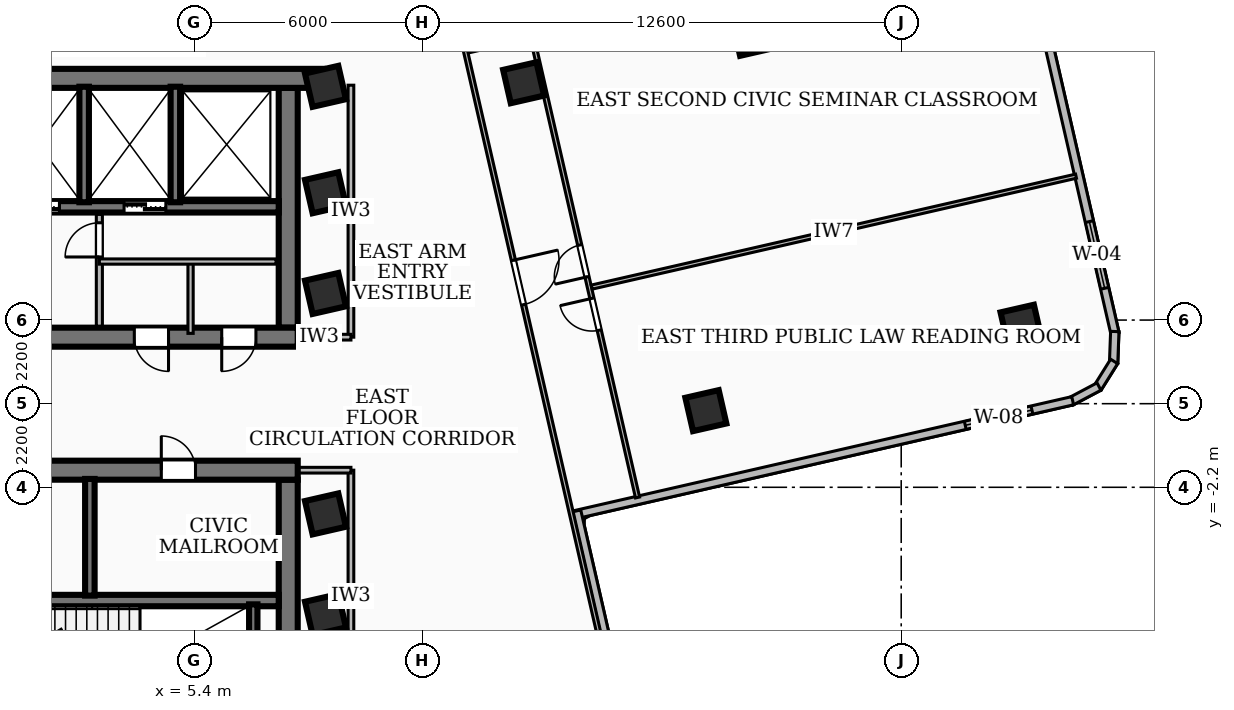
"""IFC4 building model, lengths in metres.
Left out: names, types, materials, properties, quantities, classifications, styles, units other than length and angle.
Written with IfcOpenShell. Run it as: python <this file> out.ifc"""

import sys

from ifc_helpers import new_model, si_unit, direction, frame, frame_2d, origin, origin_2d, place, context, subcontext, project, spatial, rectangle, extrude, element, fill, save


model = new_model("IFC4")
c1 = context("Model", 3, precision=1e-05, world=origin(), true_north=direction((0.0, 1.0)))
c2 = subcontext(c1, "Body", "Model", "MODEL_VIEW")
j1 = project(units=[si_unit("LENGTHUNIT", "METRE"), si_unit("PLANEANGLEUNIT", "RADIAN")], contexts=[c1])
p1 = place(None, origin())
s1 = spatial("IfcSite", under=j1, at=p1, CompositionType="ELEMENT")
p2 = place(p1, origin())
s2 = spatial("IfcBuilding", under=s1, at=p2, CompositionType="ELEMENT")
p3 = place(p2, frame((0.0, 0.0, 123.48)))
s3 = spatial("IfcBuildingStorey", under=s2, at=p3, CompositionType="ELEMENT", Elevation=123.48)
p4 = place(p3, frame((-8.78, 8.56, 0.0), z_axis=(0.0, 0.0, 1.0), x_axis=(1.0, 0.0, 0.0)))
e1 = element("IfcWall", 1, at=p4, inside=s3, PredefinedType="SHEAR", context=c2, shape_type="SweptSolid", body=[
    extrude(rectangle(XDim=17.56, YDim=0.5, at=frame_2d((8.78, 0.0))), origin(), (0.0, 0.0, 1.0), 3.34),
])
p5 = place(p3, frame((8.12, 1.75, 0.0), z_axis=(0.0, 0.0, 1.0), x_axis=(-1.0, 0.0, 0.0)))
e2 = element("IfcWall", 2, at=p5, inside=s3, PredefinedType="SHEAR", context=c2, shape_type="SweptSolid", body=[
    extrude(rectangle(XDim=16.24, YDim=0.5, at=frame_2d((8.12, 0.0))), origin(), (0.0, 0.0, 1.0), 3.34),
])
p6 = place(p5, frame((7.45, 0.0, 0.0)))
e3 = element("IfcOpeningElement", 3, at=p6, cuts=e2, PredefinedType="OPENING", context=c2, shape_type="SweptSolid", body=[
    extrude(rectangle(XDim=1.0, YDim=2.1, at=frame_2d((0.5, 1.05))), frame((0.0, 0.26, 0.0), z_axis=(0.0, -1.0, 0.0), x_axis=(1.0, 0.0, 0.0)), (0.0, 0.0, 1.0), 0.52),
])
p7 = place(p5, frame((3.4, 0.0, 0.0)))
e4 = element("IfcOpeningElement", 4, at=p7, cuts=e2, PredefinedType="OPENING", context=c2, shape_type="SweptSolid", body=[
    extrude(rectangle(XDim=0.9, YDim=2.06, at=frame_2d((0.45, 1.03))), frame((0.0, 0.26, 0.0), z_axis=(0.0, -1.0, 0.0), x_axis=(1.0, 0.0, 0.0)), (0.0, 0.0, 1.0), 0.52),
])
p8 = place(p5, frame((1.1, 0.0, 0.0)))
e5 = element("IfcOpeningElement", 5, at=p8, cuts=e2, PredefinedType="OPENING", context=c2, shape_type="SweptSolid", body=[
    extrude(rectangle(XDim=0.9, YDim=2.06, at=frame_2d((0.45, 1.03))), frame((0.0, 0.26, 0.0), z_axis=(0.0, -1.0, 0.0), x_axis=(1.0, 0.0, 0.0)), (0.0, 0.0, 1.0), 0.52),
])
p9 = place(p3, frame((7.87, 8.31, 0.0), z_axis=(0.0, 0.0, 1.0), x_axis=(0.0, -1.0, 0.0)))
e6 = element("IfcWall", 6, at=p9, inside=s3, PredefinedType="SHEAR", context=c2, shape_type="SweptSolid", body=[
    extrude(rectangle(XDim=6.31, YDim=0.5, at=frame_2d((3.155, 0.0))), origin(), (0.0, 0.0, 1.0), 3.34),
])
p10 = place(p3, frame((7.62, 5.18, 0.0), z_axis=(0.0, 0.0, 1.0), x_axis=(-1.0, 0.0, 0.0)))
e7 = element("IfcWall", 7, at=p10, inside=s3, PredefinedType="SOLIDWALL", context=c2, shape_type="SweptSolid", body=[
    extrude(rectangle(XDim=15.24, YDim=0.3, at=frame_2d((7.62, 0.0))), origin(), (0.0, 0.0, 1.0), 3.34),
])
p11 = place(p10, frame((5.77, 0.0, 0.0)))
e8 = element("IfcOpeningElement", 8, at=p11, cuts=e7, PredefinedType="OPENING", context=c2, shape_type="SweptSolid", body=[
    extrude(rectangle(XDim=1.1, YDim=2.15, at=frame_2d((0.55, 1.075))), frame((0.0, 0.16, 0.0), z_axis=(0.0, -1.0, 0.0), x_axis=(1.0, 0.0, 0.0)), (0.0, 0.0, 1.0), 0.32),
])
p12 = place(p10, frame((2.97, 0.0, 0.0)))
e9 = element("IfcOpeningElement", 9, at=p12, cuts=e7, PredefinedType="OPENING", context=c2, shape_type="SweptSolid", body=[
    extrude(rectangle(XDim=1.1, YDim=2.15, at=frame_2d((0.55, 1.075))), frame((0.0, 0.16, 0.0), z_axis=(0.0, -1.0, 0.0), x_axis=(1.0, 0.0, 0.0)), (0.0, 0.0, 1.0), 0.32),
])
p13 = place(p10, frame((7.97, 0.0, 0.0)))
e10 = element("IfcOpeningElement", 10, at=p13, cuts=e7, PredefinedType="OPENING", context=c2, shape_type="SweptSolid", body=[
    extrude(rectangle(XDim=1.0, YDim=2.1, at=frame_2d((0.5, 1.05))), frame((0.0, 0.16, 0.0), z_axis=(0.0, -1.0, 0.0), x_axis=(1.0, 0.0, 0.0)), (0.0, 0.0, 1.0), 0.32),
])
p14 = place(p3, frame((-8.12, -1.75, 0.0), z_axis=(0.0, 0.0, 1.0), x_axis=(1.0, 0.0, 0.0)))
e11 = element("IfcWall", 11, at=p14, inside=s3, PredefinedType="SHEAR", context=c2, shape_type="SweptSolid", body=[
    extrude(rectangle(XDim=16.24, YDim=0.5, at=frame_2d((8.12, 0.0))), origin(), (0.0, 0.0, 1.0), 3.34),
])
p15 = place(p14, frame((7.45, 0.0, 0.0)))
e12 = element("IfcOpeningElement", 12, at=p15, cuts=e11, PredefinedType="OPENING", context=c2, shape_type="SweptSolid", body=[
    extrude(rectangle(XDim=1.0, YDim=2.1, at=frame_2d((0.5, 1.05))), frame((0.0, 0.26, 0.0), z_axis=(0.0, -1.0, 0.0), x_axis=(1.0, 0.0, 0.0)), (0.0, 0.0, 1.0), 0.52),
])
p16 = place(p14, frame((12.65, 0.0, 0.0)))
e13 = element("IfcOpeningElement", 13, at=p16, cuts=e11, PredefinedType="OPENING", context=c2, shape_type="SweptSolid", body=[
    extrude(rectangle(XDim=0.9, YDim=2.06, at=frame_2d((0.45, 1.03))), frame((0.0, 0.26, 0.0), z_axis=(0.0, -1.0, 0.0), x_axis=(1.0, 0.0, 0.0)), (0.0, 0.0, 1.0), 0.52),
])
p17 = place(p14, frame((0.565, 0.0, 0.0)))
e14 = element("IfcOpeningElement", 14, at=p17, cuts=e11, PredefinedType="OPENING", context=c2, shape_type="SweptSolid", body=[
    extrude(rectangle(XDim=1.05, YDim=2.15, at=frame_2d((0.525, 1.075))), frame((0.0, 0.26, 0.0), z_axis=(0.0, -1.0, 0.0), x_axis=(1.0, 0.0, 0.0)), (0.0, 0.0, 1.0), 0.52),
])
p18 = place(p14, frame((2.125, 0.0, 0.0)))
e15 = element("IfcOpeningElement", 15, at=p18, cuts=e11, PredefinedType="OPENING", context=c2, shape_type="SweptSolid", body=[
    extrude(rectangle(XDim=1.05, YDim=2.15, at=frame_2d((0.525, 1.075))), frame((0.0, 0.26, 0.0), z_axis=(0.0, -1.0, 0.0), x_axis=(1.0, 0.0, 0.0)), (0.0, 0.0, 1.0), 0.52),
])
p19 = place(p14, frame((3.685, 0.0, 0.0)))
e16 = element("IfcOpeningElement", 16, at=p19, cuts=e11, PredefinedType="OPENING", context=c2, shape_type="SweptSolid", body=[
    extrude(rectangle(XDim=1.05, YDim=2.15, at=frame_2d((0.525, 1.075))), frame((0.0, 0.26, 0.0), z_axis=(0.0, -1.0, 0.0), x_axis=(1.0, 0.0, 0.0)), (0.0, 0.0, 1.0), 0.52),
])
p20 = place(p3, frame((7.87, -2.0, 0.0), z_axis=(0.0, 0.0, 1.0), x_axis=(0.0, -1.0, 0.0)))
e17 = element("IfcWall", 17, at=p20, inside=s3, PredefinedType="SHEAR", context=c2, shape_type="SweptSolid", body=[
    extrude(rectangle(XDim=6.31, YDim=0.5, at=frame_2d((3.155, 0.0))), origin(), (0.0, 0.0, 1.0), 3.34),
])
p21 = place(p3, frame((-7.62, -5.18, 0.0), z_axis=(0.0, 0.0, 1.0), x_axis=(1.0, 0.0, 0.0)))
e18 = element("IfcWall", 18, at=p21, inside=s3, PredefinedType="SOLIDWALL", context=c2, shape_type="SweptSolid", body=[
    extrude(rectangle(XDim=15.24, YDim=0.3, at=frame_2d((7.62, 0.0))), origin(), (0.0, 0.0, 1.0), 3.34),
])
p22 = place(p21, frame((5.77, 0.0, 0.0)))
e19 = element("IfcOpeningElement", 19, at=p22, cuts=e18, PredefinedType="OPENING", context=c2, shape_type="SweptSolid", body=[
    extrude(rectangle(XDim=1.1, YDim=2.15, at=frame_2d((0.55, 1.075))), frame((0.0, 0.16, 0.0), z_axis=(0.0, -1.0, 0.0), x_axis=(1.0, 0.0, 0.0)), (0.0, 0.0, 1.0), 0.32),
])
p23 = place(p21, frame((7.97, 0.0, 0.0)))
e20 = element("IfcOpeningElement", 20, at=p23, cuts=e18, PredefinedType="OPENING", context=c2, shape_type="SweptSolid", body=[
    extrude(rectangle(XDim=1.0, YDim=2.1, at=frame_2d((0.5, 1.05))), frame((0.0, 0.16, 0.0), z_axis=(0.0, -1.0, 0.0), x_axis=(1.0, 0.0, 0.0)), (0.0, 0.0, 1.0), 0.32),
])
p24 = place(p3, frame((6.95, -8.34, 0.0), z_axis=(0.0, 0.0, 1.0), x_axis=(0.0, 1.0, 0.0)))
e21 = element("IfcWall", 21, at=p24, inside=s3, PredefinedType="SOLIDWALL", context=c2, shape_type="SweptSolid", body=[
    extrude(rectangle(XDim=3.06, YDim=0.22, at=frame_2d((1.53, 0.0))), origin(), (0.0, 0.0, 1.0), 3.34),
])
for number, where, z_axis, x_axis in (
    (22, (2.5, 5.3, 0.0), (0.0, 0.0, 1.0), (0.0, 1.0, 0.0)),
    (23, (4.9, 5.3, 0.0), (0.0, 0.0, 1.0), (0.0, 1.0, 0.0)),
):
    element("IfcWall", number, at=place(p3, frame(where, z_axis=z_axis, x_axis=x_axis)), inside=s3, PredefinedType="SOLIDWALL", context=c2, shape_type="SweptSolid", body=[
        extrude(rectangle(XDim=3.04, YDim=0.25, at=frame_2d((1.52, 0.0))), origin(), (0.0, 0.0, 1.0), 3.34),
    ])
p25 = place(p3, frame((2.65, -5.05, 0.0), z_axis=(0.0, 0.0, 1.0), x_axis=(0.0, 1.0, 0.0)))
e24 = element("IfcWall", 24, at=p25, inside=s3, PredefinedType="SOLIDWALL", context=c2, shape_type="SweptSolid", body=[
    extrude(rectangle(XDim=3.07, YDim=0.25, at=frame_2d((1.535, 0.0))), origin(), (0.0, 0.0, 1.0), 3.34),
])
for number, where, z_axis, x_axis in (
    (25, (8.85, -5.55, 0.0), (0.0, 0.0, 1.0), (0.975, 0.223, 0.0)),
    (26, (8.85, -2.9, 0.0), (0.0, 0.0, 1.0), (0.975, 0.223, 0.0)),
    (27, (8.85, 2.9, 0.0), (0.0, 0.0, 1.0), (0.975, 0.223, 0.0)),
    (28, (8.85, 5.55, 0.0), (0.0, 0.0, 1.0), (0.975, 0.223, 0.0)),
    (29, (8.85, 8.35, 0.0), (0.0, 0.0, 1.0), (0.975, 0.223, 0.0)),
    (30, (18.86, -0.183, 0.0), (0.0, 0.0, 1.0), (0.975, 0.223, 0.0)),
    (31, (14.064, 8.445, 0.0), (0.0, 0.0, 1.0), (0.975, 0.223, 0.0)),
    (32, (27.153, 2.064, 0.0), (0.0, 0.0, 1.0), (0.975, 0.223, 0.0)),
    (33, (20.098, 9.692, 0.0), (0.0, 0.0, 1.0), (0.975, 0.223, 0.0)),
):
    element("IfcColumn", number, at=place(p3, frame(where, z_axis=z_axis, x_axis=x_axis)), inside=s3, PredefinedType="COLUMN", context=c2, shape_type="SweptSolid", body=[
        extrude(rectangle(XDim=0.9, YDim=0.9, at=origin_2d()), origin(), (0.0, 0.0, 1.0), 3.6),
    ])
p26 = place(p3, frame((11.182, 15.857, 0.0), z_axis=(0.0, 0.0, 1.0), x_axis=(0.223278912438, -0.974754598481, 0.0)))
e34 = element("IfcWall", 34, at=p26, inside=s3, PredefinedType="SOLIDWALL", context=c2, shape_type="SweptSolid", body=[
    extrude(rectangle(XDim=6.759, YDim=0.22, at=frame_2d((3.379, 0.0))), origin(), (0.0, 0.0, 1.0), 2.644),
])
p27 = place(p3, frame((12.585, 9.335, 0.0), z_axis=(0.0, 0.0, 1.0), x_axis=(0.974754036658, 0.223281365141, 0.0)))
e35 = element("IfcWall", 35, at=p27, inside=s3, PredefinedType="SOLIDWALL", context=c2, shape_type="SweptSolid", body=[
    extrude(rectangle(XDim=13.459, YDim=0.22, at=frame_2d((6.729, 0.0))), origin(), (0.0, 0.0, 1.0), 2.644),
])
p28 = place(p3, frame((27.476, 11.228, 0.0), z_axis=(0.0, 0.0, 1.0), x_axis=(0.223358074049, -0.974736462208, 0.0)))
e36 = element("IfcWall", 36, at=p28, inside=s3, PredefinedType="SOLIDWALL", context=c2, shape_type="SweptSolid", body=[
    extrude(rectangle(XDim=9.621, YDim=0.22, at=frame_2d((4.811, 0.0))), origin(), (0.0, 0.0, 1.0), 3.34),
])
p29 = place(p28, frame((6.604, 0.0, 0.85)))
e37 = element("IfcOpeningElement", 37, at=p29, cuts=e36, PredefinedType="OPENING", context=c2, shape_type="SweptSolid", body=[
    extrude(rectangle(XDim=1.8, YDim=2.0, at=frame_2d((0.9, 1.0))), frame((0.0, 0.12, 0.0), z_axis=(0.0, -1.0, 0.0), x_axis=(1.0, 0.0, 0.0)), (0.0, 0.0, 1.0), 0.24),
])
p30 = place(p3, frame((29.62, 1.899, 0.0), z_axis=(0.0, 0.0, 1.0), x_axis=(-0.037195813461, -0.999307996296, 0.0)))
e38 = element("IfcWall", 38, at=p30, inside=s3, PredefinedType="SOLIDWALL", context=c2, shape_type="SweptSolid", body=[
    extrude(rectangle(XDim=0.833, YDim=0.22, at=frame_2d((0.417, 0.0))), origin(), (0.0, 0.0, 1.0), 3.34),
])
p31 = place(p3, frame((29.603, 1.112, 0.0), z_axis=(0.0, 0.0, 1.0), x_axis=(-0.530240177466, -0.847847482865, 0.0)))
e39 = element("IfcWall", 39, at=p31, inside=s3, PredefinedType="SOLIDWALL", context=c2, shape_type="SweptSolid", body=[
    extrude(rectangle(XDim=0.819, YDim=0.22, at=frame_2d((0.409, 0.0))), origin(), (0.0, 0.0, 1.0), 3.34),
])
p32 = place(p3, frame((29.204, 0.451, 0.0), z_axis=(0.0, 0.0, 1.0), x_axis=(-0.883716798585, -0.468022029287, 0.0)))
e40 = element("IfcWall", 40, at=p32, inside=s3, PredefinedType="SOLIDWALL", context=c2, shape_type="SweptSolid", body=[
    extrude(rectangle(XDim=0.835, YDim=0.22, at=frame_2d((0.417, 0.0))), origin(), (0.0, 0.0, 1.0), 3.34),
])
p33 = place(p3, frame((28.512, 0.078, 0.0), z_axis=(0.0, 0.0, 1.0), x_axis=(-0.974753462872, -0.223283870038, 0.0)))
e41 = element("IfcWall", 41, at=p33, inside=s3, PredefinedType="SOLIDWALL", context=c2, shape_type="SweptSolid", body=[
    extrude(rectangle(XDim=13.458, YDim=0.22, at=frame_2d((6.729, 0.0))), origin(), (0.0, 0.0, 1.0), 3.34),
])
p34 = place(p33, frame((1.1, 0.0, 0.85)))
e42 = element("IfcOpeningElement", 42, at=p34, cuts=e41, PredefinedType="OPENING", context=c2, shape_type="SweptSolid", body=[
    extrude(rectangle(XDim=1.8, YDim=1.8, at=frame_2d((0.9, 0.9))), frame((0.0, 0.12, 0.0), z_axis=(0.0, -1.0, 0.0), x_axis=(1.0, 0.0, 0.0)), (0.0, 0.0, 1.0), 0.24),
])
p35 = place(p3, frame((15.46, -2.821, 0.0), z_axis=(0.0, 0.0, 1.0), x_axis=(0.223278912438, -0.974754598481, 0.0)))
e43 = element("IfcWall", 43, at=p35, inside=s3, PredefinedType="SOLIDWALL", context=c2, shape_type="SweptSolid", body=[
    extrude(rectangle(XDim=6.759, YDim=0.22, at=frame_2d((3.379, 0.0))), origin(), (0.0, 0.0, 1.0), 3.34),
])
p36 = place(p3, frame((2.9, 2.04, 0.0), z_axis=(0.0, 0.0, 1.0), x_axis=(0.0, 1.0, 0.0)))
e44 = element("IfcWall", 44, at=p36, inside=s3, PredefinedType="PARTITIONING", context=c2, shape_type="SweptSolid", body=[
    extrude(rectangle(XDim=2.94, YDim=0.16, at=frame_2d((1.47, 0.0))), origin(), (0.0, 0.0, 1.0), 2.57),
])
p37 = place(p36, frame((1.82, 0.0, 0.0)))
e45 = element("IfcOpeningElement", 45, at=p37, cuts=e44, PredefinedType="OPENING", context=c2, shape_type="SweptSolid", body=[
    extrude(rectangle(XDim=0.9, YDim=2.06, at=frame_2d((0.45, 1.03))), frame((0.0, 0.09, 0.0), z_axis=(0.0, -1.0, 0.0), x_axis=(1.0, 0.0, 0.0)), (0.0, 0.0, 1.0), 0.18),
])
p38 = place(p3, frame((2.9, 3.74, 0.0), z_axis=(0.0, 0.0, 1.0), x_axis=(1.0, 0.0, 0.0)))
e46 = element("IfcWall", 46, at=p38, inside=s3, PredefinedType="PARTITIONING", context=c2, shape_type="SweptSolid", body=[
    extrude(rectangle(XDim=4.65, YDim=0.138, at=frame_2d((2.325, 0.0))), origin(), (0.0, 0.0, 1.0), 3.34),
])
p39 = place(p3, frame((5.3, 1.85, 0.0), z_axis=(0.0, 0.0, 1.0), x_axis=(0.0, 1.0, 0.0)))
e47 = element("IfcWall", 47, at=p39, inside=s3, PredefinedType="PARTITIONING", context=c2, shape_type="SweptSolid", body=[
    extrude(rectangle(XDim=1.89, YDim=0.138, at=frame_2d((0.945, 0.0))), origin(), (0.0, 0.0, 1.0), 2.57),
])
p40 = place(p3, frame((9.52, 1.75, 0.0), z_axis=(0.0, 0.0, 1.0), x_axis=(0.0, 1.0, 0.0)))
e48 = element("IfcWall", 48, at=p40, inside=s3, PredefinedType="PARTITIONING", context=c2, shape_type="SweptSolid", body=[
    extrude(rectangle(XDim=6.63, YDim=0.15, at=frame_2d((3.315, 0.0))), origin(), (0.0, 0.0, 1.0), 2.57),
])
p41 = place(p3, frame((7.85, 1.75, 0.0), z_axis=(0.0, 0.0, 1.0), x_axis=(1.0, 0.0, 0.0)))
e49 = element("IfcWall", 49, at=p41, inside=s3, PredefinedType="PARTITIONING", context=c2, shape_type="SweptSolid", body=[
    extrude(rectangle(XDim=1.67, YDim=0.15, at=frame_2d((0.835, 0.0))), origin(), (0.0, 0.0, 1.0), 2.57),
])
p42 = place(p3, frame((9.52, -8.38, 0.0), z_axis=(0.0, 0.0, 1.0), x_axis=(0.0, 1.0, 0.0)))
e50 = element("IfcWall", 50, at=p42, inside=s3, PredefinedType="PARTITIONING", context=c2, shape_type="SweptSolid", body=[
    extrude(rectangle(XDim=6.63, YDim=0.15, at=frame_2d((3.315, 0.0))), origin(), (0.0, 0.0, 1.0), 2.57),
])
p43 = place(p3, frame((7.85, -1.75, 0.0), z_axis=(0.0, 0.0, 1.0), x_axis=(1.0, 0.0, 0.0)))
e51 = element("IfcWall", 51, at=p43, inside=s3, PredefinedType="PARTITIONING", context=c2, shape_type="SweptSolid", body=[
    extrude(rectangle(XDim=1.67, YDim=0.15, at=frame_2d((0.835, 0.0))), origin(), (0.0, 0.0, 1.0), 2.57),
])
p44 = place(p3, frame((11.692, 12.957, 0.0), z_axis=(0.0, 0.0, 1.0), x_axis=(0.223262093598, -0.97475845088, 0.0)))
e52 = element("IfcWall", 52, at=p44, inside=s3, PredefinedType="PARTITIONING", context=c2, shape_type="SweptSolid", body=[
    extrude(rectangle(XDim=20.04, YDim=0.11, at=frame_2d((10.02, 0.0))), origin(), (0.0, 0.0, 1.0), 2.57),
])
p45 = place(p44, frame((9.42, 0.0, 0.0)))
e53 = element("IfcOpeningElement", 53, at=p45, cuts=e52, PredefinedType="OPENING", context=c2, shape_type="SweptSolid", body=[
    extrude(rectangle(XDim=1.2, YDim=2.1, at=frame_2d((0.6, 1.05))), frame((0.0, 0.065, 0.0), z_axis=(0.0, -1.0, 0.0), x_axis=(1.0, 0.0, 0.0)), (0.0, 0.0, 1.0), 0.13),
])
p46 = place(p3, frame((15.855, 3.067, 0.0), z_axis=(0.0, 0.0, 1.0), x_axis=(0.974758398925, 0.223262320434, 0.0)))
e54 = element("IfcWall", 54, at=p46, inside=s3, PredefinedType="PARTITIONING", context=c2, shape_type="SweptSolid", body=[
    extrude(rectangle(XDim=13.075, YDim=0.11, at=frame_2d((6.538, 0.0))), origin(), (0.0, 0.0, 1.0), 2.72),
])
p47 = place(p3, frame((17.062, -2.468, 0.0), z_axis=(0.0, 0.0, 1.0), x_axis=(-0.223341555051, 0.974740247341, 0.0)))
e55 = element("IfcWall", 55, at=p47, inside=s3, PredefinedType="PARTITIONING", context=c2, shape_type="SweptSolid", body=[
    extrude(rectangle(XDim=12.43, YDim=0.11, at=frame_2d((6.215, 0.0))), origin(), (0.0, 0.0, 1.0), 2.57),
])
p48 = place(p47, frame((4.515, 0.0, 0.0)))
e56 = element("IfcOpeningElement", 56, at=p48, cuts=e55, PredefinedType="OPENING", context=c2, shape_type="SweptSolid", body=[
    extrude(rectangle(XDim=0.86, YDim=2.04, at=frame_2d((0.43, 1.02))), frame((0.0, 0.065, 0.0), z_axis=(0.0, -1.0, 0.0), x_axis=(1.0, 0.0, 0.0)), (0.0, 0.0, 1.0), 0.13),
])
p49 = place(p47, frame((5.955, 0.0, 0.0)))
e57 = element("IfcOpeningElement", 57, at=p49, cuts=e55, PredefinedType="OPENING", context=c2, shape_type="SweptSolid", body=[
    extrude(rectangle(XDim=0.86, YDim=2.04, at=frame_2d((0.43, 1.02))), frame((0.0, 0.065, 0.0), z_axis=(0.0, -1.0, 0.0), x_axis=(1.0, 0.0, 0.0)), (0.0, 0.0, 1.0), 0.13),
])
p50 = place(p29, origin())
e58 = element("IfcWindow", 58, at=p50, inside=s3, PartitioningType="SINGLE_PANEL", PredefinedType="WINDOW", context=c2, shape_type="SweptSolid", body=[
    extrude(rectangle(XDim=1.8, YDim=2.0, at=frame_2d((0.9, 1.0))), frame((0.0, 0.03, 0.0), z_axis=(0.0, -1.0, 0.0), x_axis=(1.0, 0.0, 0.0)), (0.0, 0.0, 1.0), 0.06),
])
fill(e37, e58)
p51 = place(p34, origin())
e59 = element("IfcWindow", 59, at=p51, inside=s3, PartitioningType="SINGLE_PANEL", PredefinedType="WINDOW", context=c2, shape_type="SweptSolid", body=[
    extrude(rectangle(XDim=1.8, YDim=1.8, at=frame_2d((0.9, 0.9))), frame((0.0, 0.03, 0.0), z_axis=(0.0, -1.0, 0.0), x_axis=(1.0, 0.0, 0.0)), (0.0, 0.0, 1.0), 0.06),
])
fill(e42, e59)
p52 = place(p11, origin())
e60 = element("IfcDoor", 60, at=p52, inside=s3, OperationType="DOUBLE_DOOR_SLIDING", PredefinedType="DOOR", context=c2, shape_type="SweptSolid", body=[
    extrude(rectangle(XDim=1.1, YDim=2.15, at=frame_2d((0.55, 1.075))), frame((0.0, 0.025, 0.0), z_axis=(0.0, -1.0, 0.0), x_axis=(1.0, 0.0, 0.0)), (0.0, 0.0, 1.0), 0.05),
])
fill(e8, e60)
p53 = place(p12, origin())
e61 = element("IfcDoor", 61, at=p53, inside=s3, OperationType="DOUBLE_DOOR_SLIDING", PredefinedType="DOOR", context=c2, shape_type="SweptSolid", body=[
    extrude(rectangle(XDim=1.1, YDim=2.15, at=frame_2d((0.55, 1.075))), frame((0.0, 0.025, 0.0), z_axis=(0.0, -1.0, 0.0), x_axis=(1.0, 0.0, 0.0)), (0.0, 0.0, 1.0), 0.05),
])
fill(e9, e61)
p54 = place(p16, origin())
e62 = element("IfcDoor", 62, at=p54, inside=s3, OperationType="SINGLE_SWING_LEFT", PredefinedType="DOOR", context=c2, shape_type="SweptSolid", body=[
    extrude(rectangle(XDim=0.9, YDim=2.06, at=frame_2d((0.45, 1.03))), frame((0.0, 0.025, 0.0), z_axis=(0.0, -1.0, 0.0), x_axis=(1.0, 0.0, 0.0)), (0.0, 0.0, 1.0), 0.05),
])
fill(e13, e62)
p55 = place(p7, origin())
e63 = element("IfcDoor", 63, at=p55, inside=s3, OperationType="SINGLE_SWING_LEFT", PredefinedType="DOOR", context=c2, shape_type="SweptSolid", body=[
    extrude(rectangle(XDim=0.9, YDim=2.06, at=frame_2d((0.45, 1.03))), frame((0.0, 0.025, 0.0), z_axis=(0.0, -1.0, 0.0), x_axis=(1.0, 0.0, 0.0)), (0.0, 0.0, 1.0), 0.05),
])
fill(e4, e63)
p56 = place(p8, origin())
e64 = element("IfcDoor", 64, at=p56, inside=s3, OperationType="SINGLE_SWING_RIGHT", PredefinedType="DOOR", context=c2, shape_type="SweptSolid", body=[
    extrude(rectangle(XDim=0.9, YDim=2.06, at=frame_2d((0.45, 1.03))), frame((0.0, 0.025, 0.0), z_axis=(0.0, -1.0, 0.0), x_axis=(1.0, 0.0, 0.0)), (0.0, 0.0, 1.0), 0.05),
])
fill(e5, e64)
p57 = place(p37, origin())
e65 = element("IfcDoor", 65, at=p57, inside=s3, OperationType="SINGLE_SWING_LEFT", PredefinedType="DOOR", context=c2, shape_type="SweptSolid", body=[
    extrude(rectangle(XDim=0.9, YDim=2.06, at=frame_2d((0.45, 1.03))), frame((0.0, 0.025, 0.0), z_axis=(0.0, -1.0, 0.0), x_axis=(1.0, 0.0, 0.0)), (0.0, 0.0, 1.0), 0.05),
])
fill(e45, e65)
p58 = place(p45, origin())
e66 = element("IfcDoor", 66, at=p58, inside=s3, OperationType="SINGLE_SWING_LEFT", PredefinedType="DOOR", context=c2, shape_type="SweptSolid", body=[
    extrude(rectangle(XDim=1.2, YDim=2.1, at=frame_2d((0.6, 1.05))), frame((0.0, 0.025, 0.0), z_axis=(0.0, -1.0, 0.0), x_axis=(1.0, 0.0, 0.0)), (0.0, 0.0, 1.0), 0.05),
])
fill(e53, e66)
p59 = place(p48, origin())
e67 = element("IfcDoor", 67, at=p59, inside=s3, OperationType="SINGLE_SWING_RIGHT", PredefinedType="DOOR", context=c2, shape_type="SweptSolid", body=[
    extrude(rectangle(XDim=0.86, YDim=2.04, at=frame_2d((0.43, 1.02))), frame((0.0, 0.025, 0.0), z_axis=(0.0, -1.0, 0.0), x_axis=(1.0, 0.0, 0.0)), (0.0, 0.0, 1.0), 0.05),
])
fill(e56, e67)
p60 = place(p49, origin())
e68 = element("IfcDoor", 68, at=p60, inside=s3, OperationType="SINGLE_SWING_LEFT", PredefinedType="DOOR", context=c2, shape_type="SweptSolid", body=[
    extrude(rectangle(XDim=0.86, YDim=2.04, at=frame_2d((0.43, 1.02))), frame((0.0, 0.025, 0.0), z_axis=(0.0, -1.0, 0.0), x_axis=(1.0, 0.0, 0.0)), (0.0, 0.0, 1.0), 0.05),
])
fill(e57, e68)
save(model, sys.argv[1])
